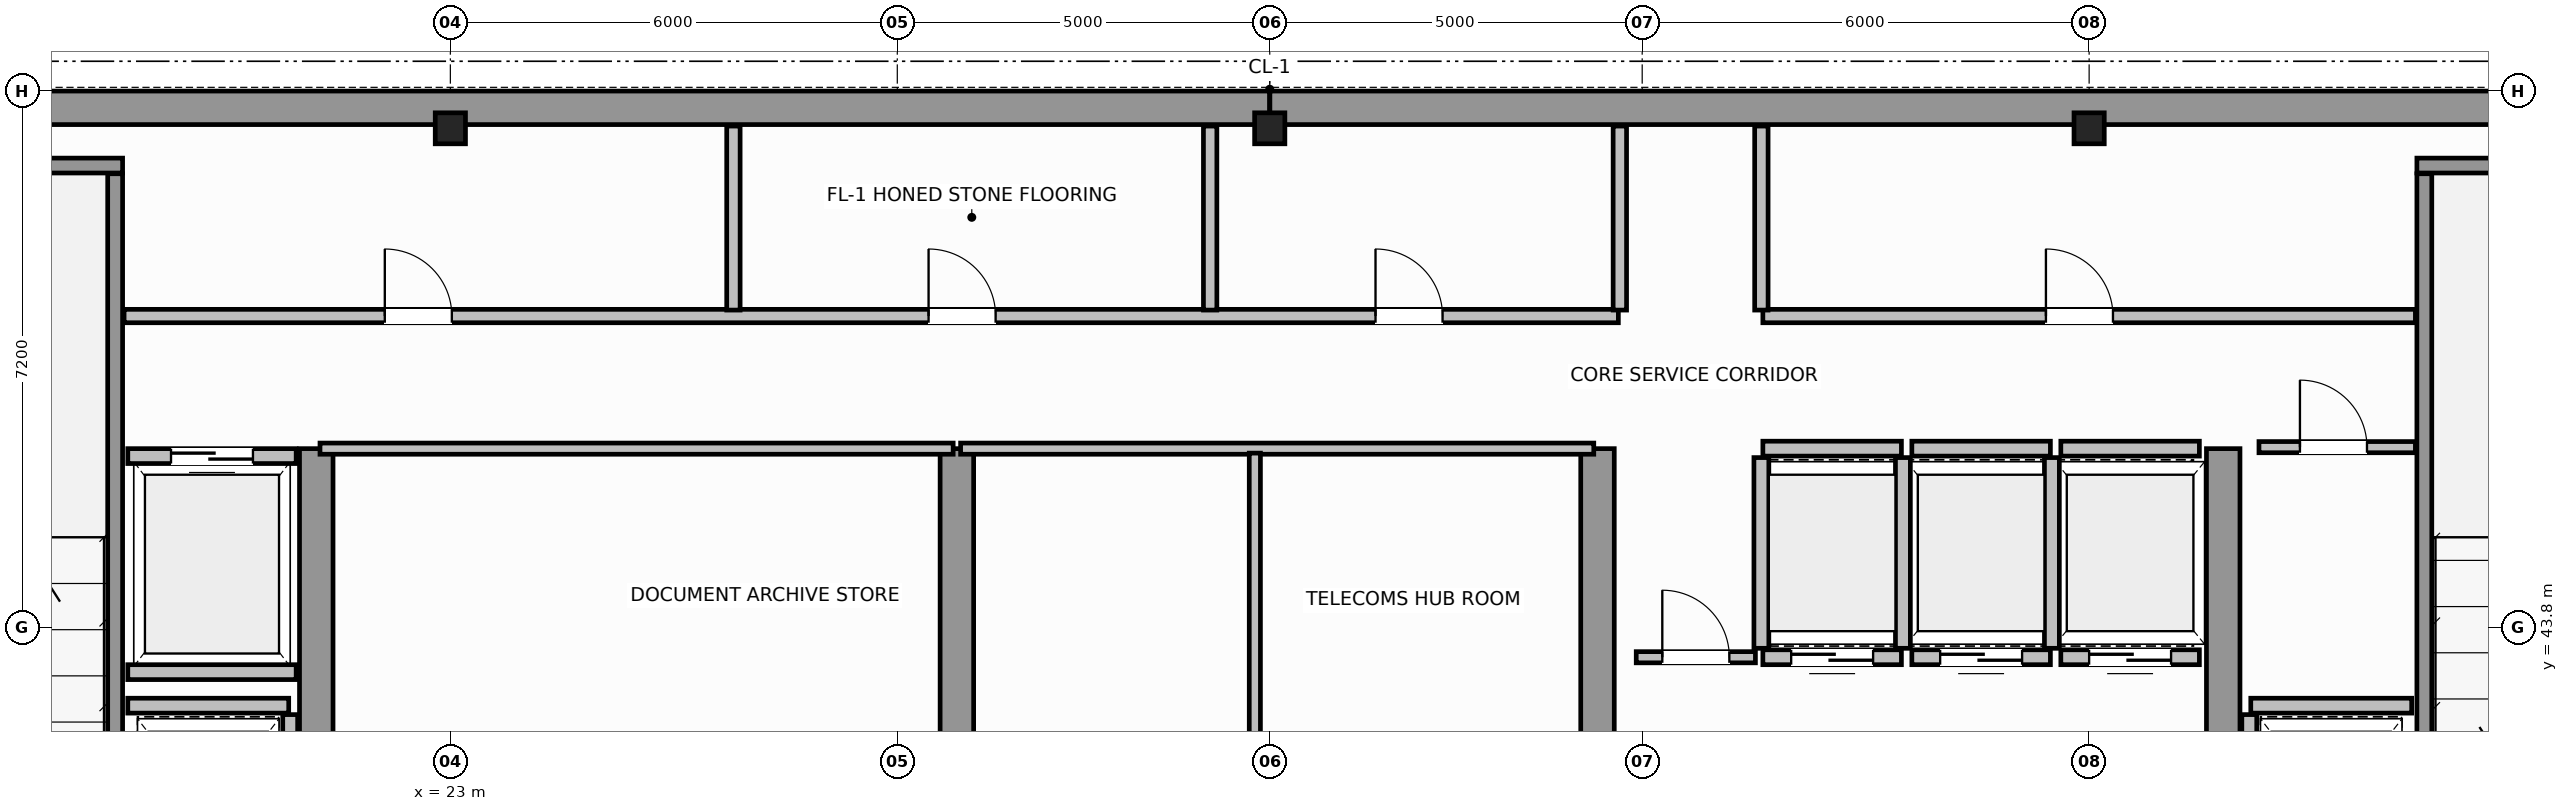
"""IFC4 building model, lengths in metres.
Left out: names, types, materials, properties, quantities, classifications, styles, units other than length and angle.
Written with IfcOpenShell. Run it as: python <this file> out.ifc"""

import sys

from ifc_helpers import new_model, si_unit, direction, frame, frame_2d, origin, origin_2d, place, context, subcontext, project, spatial, rectangle, i_section, extrude, source, transform, mapped, element, fill, save


model = new_model("IFC4")
c1 = context("Model", 3, precision=1e-05, world=origin(), true_north=direction((0.0, 1.0)))
c2 = subcontext(c1, "Body", "Model", "MODEL_VIEW")
j1 = project(units=[si_unit("LENGTHUNIT", "METRE"), si_unit("PLANEANGLEUNIT", "RADIAN")], contexts=[c1])
p1 = place(None, origin())
s1 = spatial("IfcSite", under=j1, at=p1, CompositionType="ELEMENT")
p2 = place(p1, origin())
s2 = spatial("IfcBuilding", under=s1, at=p2, CompositionType="ELEMENT")
p3 = place(p2, frame((0.0, 0.0, 272.6)))
s3 = spatial("IfcBuildingStorey", under=s2, at=p3, CompositionType="ELEMENT", Elevation=272.6)
m1 = source(origin(), c2, "Body", "SweptSolid", [
    extrude(i_section(OverallWidth=0.406, OverallDepth=0.416, WebThickness=0.03, FlangeThickness=0.042, FilletRadius=0.015, at=origin_2d()), origin(), (0.0, 0.0, 1.0), 3.8),
])
for number, where, z_axis, x_axis in (
    (1, (23.0, 50.5, 0.0), (0.0, 0.0, 1.0), (1.0, 0.0, 0.0)),
    (2, (34.0, 50.5, 0.0), (0.0, 0.0, 1.0), (1.0, 0.0, 0.0)),
    (3, (45.0, 50.5, 0.0), (0.0, 0.0, 1.0), (1.0, 0.0, 0.0)),
):
    element("IfcColumn", number, at=place(p3, frame(where, z_axis=z_axis, x_axis=x_axis)), inside=s3, PredefinedType="COLUMN", context=c2, shape_type="MappedRepresentation", body=[
        mapped(m1, transform((0.0, 0.0, 0.0), scale=1.0)),
    ])
for number, where, z_axis, x_axis in (
    (4, (14.229, 50.775, 0.0), (0.0, 0.0, 1.0), (1.0, 0.0, 0.0)),
    (5, (34.002, 50.775, 0.0), (0.0, 0.0, 1.0), (1.0, 0.0, 0.0)),
):
    element("IfcWall", number, at=place(p3, frame(where, z_axis=z_axis, x_axis=x_axis)), inside=s3, PredefinedType="SHEAR", context=c2, shape_type="SweptSolid", body=[
        extrude(rectangle(XDim=19.769, YDim=0.45, at=frame_2d((9.885, 0.0))), origin(), (0.0, 0.0, 1.0), 3.8),
    ])
for number, where, z_axis, x_axis in (
    (6, (21.2, 36.745, 0.0), (0.0, 0.0, 1.0), (0.0, 1.0, 0.0)),
    (7, (29.8, 36.745, 0.0), (0.0, 0.0, 1.0), (0.0, 1.0, 0.0)),
    (8, (38.4, 36.745, 0.0), (0.0, 0.0, 1.0), (0.0, 1.0, 0.0)),
    (9, (46.8, 36.745, 0.0), (0.0, 0.0, 1.0), (0.0, 1.0, 0.0)),
):
    element("IfcWall", number, at=place(p3, frame(where, z_axis=z_axis, x_axis=x_axis)), inside=s3, PredefinedType="SHEAR", context=c2, shape_type="SweptSolid", body=[
        extrude(rectangle(XDim=9.455, YDim=0.45, at=frame_2d((4.728, 0.0))), origin(), (0.0, 0.0, 1.0), 3.8),
    ])
p4 = place(p3, frame((14.225, 50.0, 0.0), z_axis=(0.0, 0.0, 1.0), x_axis=(1.0, 0.0, 0.0)))
e10 = element("IfcWall", 10, at=p4, inside=s3, PredefinedType="SOLIDWALL", context=c2, shape_type="SweptSolid", body=[
    extrude(rectangle(XDim=4.375, YDim=0.2, at=frame_2d((2.188, 0.0))), origin(), (0.0, 0.0, 1.0), 3.8),
])
p5 = place(p3, frame((18.5, 39.96, 0.0), z_axis=(0.0, 0.0, 1.0), x_axis=(0.0, 1.0, 0.0)))
e11 = element("IfcWall", 11, at=p5, inside=s3, PredefinedType="SOLIDWALL", context=c2, shape_type="SweptSolid", body=[
    extrude(rectangle(XDim=9.93, YDim=0.2, at=frame_2d((4.965, 0.0))), origin(), (0.0, 0.0, 1.0), 3.8),
])
p6 = place(p3, frame((49.4, 50.0, 0.0), z_axis=(0.0, 0.0, 1.0), x_axis=(1.0, 0.0, 0.0)))
e12 = element("IfcWall", 12, at=p6, inside=s3, PredefinedType="SOLIDWALL", context=c2, shape_type="SweptSolid", body=[
    extrude(rectangle(XDim=4.375, YDim=0.2, at=frame_2d((2.188, 0.0))), origin(), (0.0, 0.0, 1.0), 3.8),
])
p7 = place(p3, frame((49.5, 39.96, 0.0), z_axis=(0.0, 0.0, 1.0), x_axis=(0.0, 1.0, 0.0)))
e13 = element("IfcWall", 13, at=p7, inside=s3, PredefinedType="SOLIDWALL", context=c2, shape_type="SweptSolid", body=[
    extrude(rectangle(XDim=9.93, YDim=0.2, at=frame_2d((4.965, 0.0))), origin(), (0.0, 0.0, 1.0), 3.8),
])
p8 = place(p3, frame((40.62, 43.4, 0.0), z_axis=(0.0, 0.0, 1.0), x_axis=(1.0, 0.0, 0.0)))
e14 = element("IfcWall", 14, at=p8, inside=s3, PredefinedType="SOLIDWALL", context=c2, shape_type="SweptSolid", body=[
    extrude(rectangle(XDim=1.86, YDim=0.2, at=frame_2d((0.93, 0.0))), origin(), (0.0, 0.0, 1.0), 3.58),
])
p9 = place(p8, frame((0.38, 0.0, 0.0)))
e15 = element("IfcOpeningElement", 15, at=p9, cuts=e14, PredefinedType="OPENING", context=c2, shape_type="SweptSolid", body=[
    extrude(rectangle(XDim=1.1, YDim=2.15, at=frame_2d((0.55, 1.075))), frame((0.0, 0.11, 0.0), z_axis=(0.0, -1.0, 0.0), x_axis=(1.0, 0.0, 0.0)), (0.0, 0.0, 1.0), 0.22),
])
p10 = place(p3, frame((40.62, 46.2, 0.0), z_axis=(0.0, 0.0, 1.0), x_axis=(1.0, 0.0, 0.0)))
e16 = element("IfcWall", 16, at=p10, inside=s3, PredefinedType="SOLIDWALL", context=c2, shape_type="SweptSolid", body=[
    extrude(rectangle(XDim=1.86, YDim=0.2, at=frame_2d((0.93, 0.0))), origin(), (0.0, 0.0, 1.0), 3.58),
])
for number, where, z_axis, x_axis in (
    (17, (40.6, 43.52, 0.0), (0.0, 0.0, 1.0), (0.0, 1.0, 0.0)),
    (18, (42.5, 43.52, 0.0), (0.0, 0.0, 1.0), (0.0, 1.0, 0.0)),
):
    element("IfcWall", number, at=place(p3, frame(where, z_axis=z_axis, x_axis=x_axis)), inside=s3, PredefinedType="SOLIDWALL", context=c2, shape_type="SweptSolid", body=[
        extrude(rectangle(XDim=2.56, YDim=0.2, at=frame_2d((1.28, 0.0))), origin(), (0.0, 0.0, 1.0), 3.58),
    ])
p11 = place(p3, frame((42.62, 43.4, 0.0), z_axis=(0.0, 0.0, 1.0), x_axis=(1.0, 0.0, 0.0)))
e19 = element("IfcWall", 19, at=p11, inside=s3, PredefinedType="SOLIDWALL", context=c2, shape_type="SweptSolid", body=[
    extrude(rectangle(XDim=1.86, YDim=0.2, at=frame_2d((0.93, 0.0))), origin(), (0.0, 0.0, 1.0), 3.58),
])
p12 = place(p11, frame((0.38, 0.0, 0.0)))
e20 = element("IfcOpeningElement", 20, at=p12, cuts=e19, PredefinedType="OPENING", context=c2, shape_type="SweptSolid", body=[
    extrude(rectangle(XDim=1.1, YDim=2.15, at=frame_2d((0.55, 1.075))), frame((0.0, 0.11, 0.0), z_axis=(0.0, -1.0, 0.0), x_axis=(1.0, 0.0, 0.0)), (0.0, 0.0, 1.0), 0.22),
])
p13 = place(p3, frame((42.62, 46.2, 0.0), z_axis=(0.0, 0.0, 1.0), x_axis=(1.0, 0.0, 0.0)))
e21 = element("IfcWall", 21, at=p13, inside=s3, PredefinedType="SOLIDWALL", context=c2, shape_type="SweptSolid", body=[
    extrude(rectangle(XDim=1.86, YDim=0.2, at=frame_2d((0.93, 0.0))), origin(), (0.0, 0.0, 1.0), 3.58),
])
p14 = place(p3, frame((44.5, 43.52, 0.0), z_axis=(0.0, 0.0, 1.0), x_axis=(0.0, 1.0, 0.0)))
e22 = element("IfcWall", 22, at=p14, inside=s3, PredefinedType="SOLIDWALL", context=c2, shape_type="SweptSolid", body=[
    extrude(rectangle(XDim=2.56, YDim=0.2, at=frame_2d((1.28, 0.0))), origin(), (0.0, 0.0, 1.0), 3.58),
])
p15 = place(p3, frame((44.62, 43.4, 0.0), z_axis=(0.0, 0.0, 1.0), x_axis=(1.0, 0.0, 0.0)))
e23 = element("IfcWall", 23, at=p15, inside=s3, PredefinedType="SOLIDWALL", context=c2, shape_type="SweptSolid", body=[
    extrude(rectangle(XDim=1.86, YDim=0.2, at=frame_2d((0.93, 0.0))), origin(), (0.0, 0.0, 1.0), 3.58),
])
p16 = place(p15, frame((0.38, 0.0, 0.0)))
e24 = element("IfcOpeningElement", 24, at=p16, cuts=e23, PredefinedType="OPENING", context=c2, shape_type="SweptSolid", body=[
    extrude(rectangle(XDim=1.1, YDim=2.15, at=frame_2d((0.55, 1.075))), frame((0.0, 0.11, 0.0), z_axis=(0.0, -1.0, 0.0), x_axis=(1.0, 0.0, 0.0)), (0.0, 0.0, 1.0), 0.22),
])
p17 = place(p3, frame((44.62, 46.2, 0.0), z_axis=(0.0, 0.0, 1.0), x_axis=(1.0, 0.0, 0.0)))
e25 = element("IfcWall", 25, at=p17, inside=s3, PredefinedType="SOLIDWALL", context=c2, shape_type="SweptSolid", body=[
    extrude(rectangle(XDim=1.86, YDim=0.2, at=frame_2d((0.93, 0.0))), origin(), (0.0, 0.0, 1.0), 3.58),
])
p18 = place(p3, frame((18.67, 46.1, 0.0), z_axis=(0.0, 0.0, 1.0), x_axis=(1.0, 0.0, 0.0)))
e26 = element("IfcWall", 26, at=p18, inside=s3, PredefinedType="SOLIDWALL", context=c2, shape_type="SweptSolid", body=[
    extrude(rectangle(XDim=2.26, YDim=0.2, at=frame_2d((1.13, 0.0))), origin(), (0.0, 0.0, 1.0), 3.58),
])
p19 = place(p18, frame((0.58, 0.0, 0.0)))
e27 = element("IfcOpeningElement", 27, at=p19, cuts=e26, PredefinedType="OPENING", context=c2, shape_type="SweptSolid", body=[
    extrude(rectangle(XDim=1.1, YDim=2.15, at=frame_2d((0.55, 1.075))), frame((0.0, 0.11, 0.0), z_axis=(0.0, -1.0, 0.0), x_axis=(1.0, 0.0, 0.0)), (0.0, 0.0, 1.0), 0.22),
])
p20 = place(p3, frame((18.67, 43.2, 0.0), z_axis=(0.0, 0.0, 1.0), x_axis=(1.0, 0.0, 0.0)))
e28 = element("IfcWall", 28, at=p20, inside=s3, PredefinedType="SOLIDWALL", context=c2, shape_type="SweptSolid", body=[
    extrude(rectangle(XDim=2.26, YDim=0.2, at=frame_2d((1.13, 0.0))), origin(), (0.0, 0.0, 1.0), 3.58),
])
p21 = place(p3, frame((18.67, 42.75, 0.0), z_axis=(0.0, 0.0, 1.0), x_axis=(1.0, 0.0, 0.0)))
e29 = element("IfcWall", 29, at=p21, inside=s3, PredefinedType="SOLIDWALL", context=c2, shape_type="SweptSolid", body=[
    extrude(rectangle(XDim=2.16, YDim=0.2, at=frame_2d((1.08, 0.0))), origin(), (0.0, 0.0, 1.0), 3.58),
])
p22 = place(p3, frame((20.85, 40.07, 0.0), z_axis=(0.0, 0.0, 1.0), x_axis=(0.0, 1.0, 0.0)))
e30 = element("IfcWall", 30, at=p22, inside=s3, PredefinedType="SOLIDWALL", context=c2, shape_type="SweptSolid", body=[
    extrude(rectangle(XDim=2.56, YDim=0.2, at=frame_2d((1.28, 0.0))), origin(), (0.0, 0.0, 1.0), 3.58),
])
p23 = place(p3, frame((47.17, 42.75, 0.0), z_axis=(0.0, 0.0, 1.0), x_axis=(1.0, 0.0, 0.0)))
e31 = element("IfcWall", 31, at=p23, inside=s3, PredefinedType="SOLIDWALL", context=c2, shape_type="SweptSolid", body=[
    extrude(rectangle(XDim=2.16, YDim=0.2, at=frame_2d((1.08, 0.0))), origin(), (0.0, 0.0, 1.0), 3.58),
])
p24 = place(p3, frame((47.15, 40.07, 0.0), z_axis=(0.0, 0.0, 1.0), x_axis=(0.0, 1.0, 0.0)))
e32 = element("IfcWall", 32, at=p24, inside=s3, PredefinedType="SOLIDWALL", context=c2, shape_type="SweptSolid", body=[
    extrude(rectangle(XDim=2.56, YDim=0.2, at=frame_2d((1.28, 0.0))), origin(), (0.0, 0.0, 1.0), 3.58),
])
for number, where, z_axis, x_axis in (
    (33, (21.25, 46.2, 0.0), (0.0, 0.0, 1.0), (1.0, 0.0, 0.0)),
    (34, (29.85, 46.2, 0.0), (0.0, 0.0, 1.0), (1.0, 0.0, 0.0)),
):
    element("IfcWall", number, at=place(p3, frame(where, z_axis=z_axis, x_axis=x_axis)), inside=s3, PredefinedType="PARTITIONING", context=c2, shape_type="SweptSolid", body=[
        extrude(rectangle(XDim=8.5, YDim=0.15, at=frame_2d((4.25, 0.0))), origin(), (0.0, 0.0, 1.0), 3.58),
    ])
p25 = place(p3, frame((33.8, 36.56, 0.0), z_axis=(0.0, 0.0, 1.0), x_axis=(0.0, 1.0, 0.0)))
e35 = element("IfcWall", 35, at=p25, inside=s3, PredefinedType="PARTITIONING", context=c2, shape_type="SweptSolid", body=[
    extrude(rectangle(XDim=9.58, YDim=0.15, at=frame_2d((4.79, 0.0))), origin(), (0.0, 0.0, 1.0), 3.58),
])
p26 = place(p25, frame((4.2, 0.0, 0.0)))
e36 = element("IfcOpeningElement", 36, at=p26, cuts=e35, PredefinedType="OPENING", context=c2, shape_type="SweptSolid", body=[
    extrude(rectangle(XDim=0.9, YDim=2.1, at=frame_2d((0.45, 1.05))), frame((0.0, 0.085, 0.0), z_axis=(0.0, -1.0, 0.0), x_axis=(1.0, 0.0, 0.0)), (0.0, 0.0, 1.0), 0.17),
])
p27 = place(p3, frame((47.28, 46.22, 0.0), z_axis=(0.0, 0.0, 1.0), x_axis=(1.0, 0.0, 0.0)))
e37 = element("IfcWall", 37, at=p27, inside=s3, PredefinedType="PARTITIONING", context=c2, shape_type="SweptSolid", body=[
    extrude(rectangle(XDim=2.1, YDim=0.15, at=frame_2d((1.05, 0.0))), origin(), (0.0, 0.0, 1.0), 3.58),
])
p28 = place(p27, frame((0.55, 0.0, 0.0)))
e38 = element("IfcOpeningElement", 38, at=p28, cuts=e37, PredefinedType="OPENING", context=c2, shape_type="SweptSolid", body=[
    extrude(rectangle(XDim=0.9, YDim=2.1, at=frame_2d((0.45, 1.05))), frame((0.0, 0.085, 0.0), z_axis=(0.0, -1.0, 0.0), x_axis=(1.0, 0.0, 0.0)), (0.0, 0.0, 1.0), 0.17),
])
p29 = place(p3, frame((38.92, 43.4, 0.0), z_axis=(0.0, 0.0, 1.0), x_axis=(1.0, 0.0, 0.0)))
e39 = element("IfcWall", 39, at=p29, inside=s3, PredefinedType="PARTITIONING", context=c2, shape_type="SweptSolid", body=[
    extrude(rectangle(XDim=1.6, YDim=0.15, at=frame_2d((0.8, 0.0))), origin(), (0.0, 0.0, 1.0), 3.58),
])
p30 = place(p29, frame((0.35, 0.0, 0.0)))
e40 = element("IfcOpeningElement", 40, at=p30, cuts=e39, PredefinedType="OPENING", context=c2, shape_type="SweptSolid", body=[
    extrude(rectangle(XDim=0.9, YDim=2.1, at=frame_2d((0.45, 1.05))), frame((0.0, 0.085, 0.0), z_axis=(0.0, -1.0, 0.0), x_axis=(1.0, 0.0, 0.0)), (0.0, 0.0, 1.0), 0.17),
])
p31 = place(p3, frame((18.62, 47.98, 0.0), z_axis=(0.0, 0.0, 1.0), x_axis=(1.0, 0.0, 0.0)))
e41 = element("IfcWall", 41, at=p31, inside=s3, PredefinedType="PLUMBINGWALL", context=c2, shape_type="SweptSolid", body=[
    extrude(rectangle(XDim=20.06, YDim=0.18, at=frame_2d((10.03, 0.0))), origin(), (0.0, 0.0, 1.0), 3.58),
])
p32 = place(p31, frame((3.5, 0.0, 0.0)))
e42 = element("IfcOpeningElement", 42, at=p32, cuts=e41, PredefinedType="OPENING", context=c2, shape_type="SweptSolid", body=[
    extrude(rectangle(XDim=0.9, YDim=2.15, at=frame_2d((0.45, 1.075))), frame((0.0, 0.1, 0.0), z_axis=(0.0, -1.0, 0.0), x_axis=(1.0, 0.0, 0.0)), (0.0, 0.0, 1.0), 0.2),
])
p33 = place(p31, frame((10.8, 0.0, 0.0)))
e43 = element("IfcOpeningElement", 43, at=p33, cuts=e41, PredefinedType="OPENING", context=c2, shape_type="SweptSolid", body=[
    extrude(rectangle(XDim=0.9, YDim=2.15, at=frame_2d((0.45, 1.075))), frame((0.0, 0.1, 0.0), z_axis=(0.0, -1.0, 0.0), x_axis=(1.0, 0.0, 0.0)), (0.0, 0.0, 1.0), 0.2),
])
p34 = place(p31, frame((16.8, 0.0, 0.0)))
e44 = element("IfcOpeningElement", 44, at=p34, cuts=e41, PredefinedType="OPENING", context=c2, shape_type="SweptSolid", body=[
    extrude(rectangle(XDim=0.9, YDim=2.15, at=frame_2d((0.45, 1.075))), frame((0.0, 0.1, 0.0), z_axis=(0.0, -1.0, 0.0), x_axis=(1.0, 0.0, 0.0)), (0.0, 0.0, 1.0), 0.2),
])
p35 = place(p3, frame((40.62, 47.98, 0.0), z_axis=(0.0, 0.0, 1.0), x_axis=(1.0, 0.0, 0.0)))
e45 = element("IfcWall", 45, at=p35, inside=s3, PredefinedType="PLUMBINGWALL", context=c2, shape_type="SweptSolid", body=[
    extrude(rectangle(XDim=8.76, YDim=0.18, at=frame_2d((4.38, 0.0))), origin(), (0.0, 0.0, 1.0), 3.58),
])
p36 = place(p35, frame((3.8, 0.0, 0.0)))
e46 = element("IfcOpeningElement", 46, at=p36, cuts=e45, PredefinedType="OPENING", context=c2, shape_type="SweptSolid", body=[
    extrude(rectangle(XDim=0.9, YDim=2.15, at=frame_2d((0.45, 1.075))), frame((0.0, 0.1, 0.0), z_axis=(0.0, -1.0, 0.0), x_axis=(1.0, 0.0, 0.0)), (0.0, 0.0, 1.0), 0.2),
])
for number, where, z_axis, x_axis in (
    (47, (26.8, 48.06, 0.0), (0.0, 0.0, 1.0), (0.0, 1.0, 0.0)),
    (48, (33.2, 48.06, 0.0), (0.0, 0.0, 1.0), (0.0, 1.0, 0.0)),
    (49, (38.7, 48.06, 0.0), (0.0, 0.0, 1.0), (0.0, 1.0, 0.0)),
    (50, (40.6, 48.06, 0.0), (0.0, 0.0, 1.0), (0.0, 1.0, 0.0)),
):
    element("IfcWall", number, at=place(p3, frame(where, z_axis=z_axis, x_axis=x_axis)), inside=s3, PredefinedType="PLUMBINGWALL", context=c2, shape_type="SweptSolid", body=[
        extrude(rectangle(XDim=2.47, YDim=0.18, at=frame_2d((1.235, 0.0))), origin(), (0.0, 0.0, 1.0), 3.58),
    ])
m2 = source(origin(), c2, "Body", "SweptSolid", [
    extrude(rectangle(XDim=1.1, YDim=2.15, at=frame_2d((0.55, 1.075))), frame((0.0, 0.025, 0.0), z_axis=(0.0, -1.0, 0.0), x_axis=(1.0, 0.0, 0.0)), (0.0, 0.0, 1.0), 0.05),
])
p37 = place(p9, origin())
e51 = element("IfcDoor", 51, at=p37, inside=s3, OperationType="DOUBLE_DOOR_SLIDING", PredefinedType="DOOR", context=c2, shape_type="MappedRepresentation", body=[
    mapped(m2, transform((0.0, 0.0, 0.0), scale=1.0)),
])
fill(e15, e51)
p38 = place(p12, origin())
e52 = element("IfcDoor", 52, at=p38, inside=s3, OperationType="DOUBLE_DOOR_SLIDING", PredefinedType="DOOR", context=c2, shape_type="MappedRepresentation", body=[
    mapped(m2, transform((0.0, 0.0, 0.0), scale=1.0)),
])
fill(e20, e52)
p39 = place(p16, origin())
e53 = element("IfcDoor", 53, at=p39, inside=s3, OperationType="DOUBLE_DOOR_SLIDING", PredefinedType="DOOR", context=c2, shape_type="MappedRepresentation", body=[
    mapped(m2, transform((0.0, 0.0, 0.0), scale=1.0)),
])
fill(e24, e53)
p40 = place(p19, origin())
e54 = element("IfcDoor", 54, at=p40, inside=s3, OperationType="DOUBLE_DOOR_SLIDING", PredefinedType="DOOR", context=c2, shape_type="MappedRepresentation", body=[
    mapped(m2, transform((0.0, 0.0, 0.0), scale=1.0)),
])
fill(e27, e54)
m3 = source(origin(), c2, "Body", "SweptSolid", [
    extrude(rectangle(XDim=0.9, YDim=2.1, at=frame_2d((0.45, 1.05))), frame((0.0, 0.025, 0.0), z_axis=(0.0, -1.0, 0.0), x_axis=(1.0, 0.0, 0.0)), (0.0, 0.0, 1.0), 0.05),
])
p41 = place(p28, origin())
e55 = element("IfcDoor", 55, at=p41, inside=s3, OperationType="SINGLE_SWING_RIGHT", PredefinedType="DOOR", context=c2, shape_type="MappedRepresentation", body=[
    mapped(m3, transform((0.0, 0.0, 0.0), scale=1.0)),
])
fill(e38, e55)
p42 = place(p30, origin())
e56 = element("IfcDoor", 56, at=p42, inside=s3, OperationType="SINGLE_SWING_LEFT", PredefinedType="DOOR", context=c2, shape_type="MappedRepresentation", body=[
    mapped(m3, transform((0.0, 0.0, 0.0), scale=1.0)),
])
fill(e40, e56)
m4 = source(origin(), c2, "Body", "SweptSolid", [
    extrude(rectangle(XDim=0.9, YDim=2.15, at=frame_2d((0.45, 1.075))), frame((0.0, 0.025, 0.0), z_axis=(0.0, -1.0, 0.0), x_axis=(1.0, 0.0, 0.0)), (0.0, 0.0, 1.0), 0.05),
])
p43 = place(p32, origin())
e57 = element("IfcDoor", 57, at=p43, inside=s3, OperationType="SINGLE_SWING_LEFT", PredefinedType="DOOR", context=c2, shape_type="MappedRepresentation", body=[
    mapped(m4, transform((0.0, 0.0, 0.0), scale=1.0)),
])
fill(e42, e57)
p44 = place(p33, origin())
e58 = element("IfcDoor", 58, at=p44, inside=s3, OperationType="SINGLE_SWING_RIGHT", PredefinedType="DOOR", context=c2, shape_type="MappedRepresentation", body=[
    mapped(m4, transform((0.0, 0.0, 0.0), scale=1.0)),
])
fill(e43, e58)
p45 = place(p34, origin())
e59 = element("IfcDoor", 59, at=p45, inside=s3, OperationType="SINGLE_SWING_LEFT", PredefinedType="DOOR", context=c2, shape_type="MappedRepresentation", body=[
    mapped(m4, transform((0.0, 0.0, 0.0), scale=1.0)),
])
fill(e44, e59)
p46 = place(p36, origin())
e60 = element("IfcDoor", 60, at=p46, inside=s3, OperationType="SINGLE_SWING_RIGHT", PredefinedType="DOOR", context=c2, shape_type="MappedRepresentation", body=[
    mapped(m4, transform((0.0, 0.0, 0.0), scale=1.0)),
])
fill(e46, e60)
save(model, sys.argv[1])
